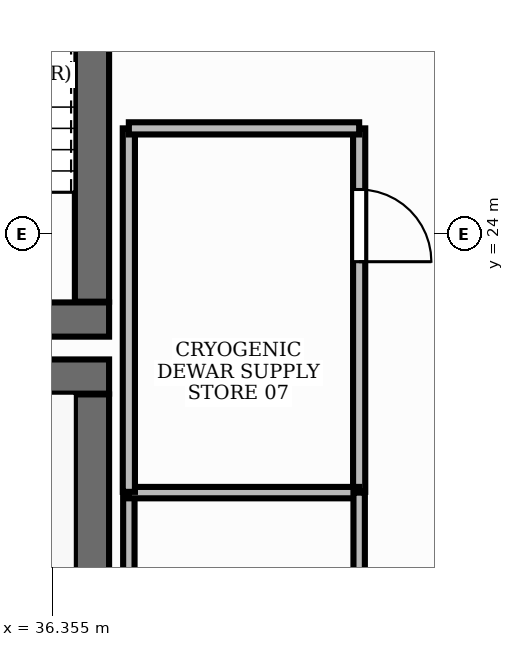
"""IFC4 building model, lengths in metres.
Left out: names, types, materials, properties, quantities, classifications, styles, units other than length and angle.
Written with IfcOpenShell. Run it as: python <this file> out.ifc"""

import sys

from ifc_helpers import new_model, si_unit, direction, frame, frame_2d, origin, place, context, subcontext, project, spatial, rectangle, extrude, element, fill, save


model = new_model("IFC4")
c1 = context("Model", 3, precision=1e-05, world=origin(), true_north=direction((0.0, 1.0)))
c2 = subcontext(c1, "Body", "Model", "MODEL_VIEW")
j1 = project(units=[si_unit("LENGTHUNIT", "METRE"), si_unit("PLANEANGLEUNIT", "RADIAN")], contexts=[c1])
p1 = place(None, origin())
s1 = spatial("IfcSite", under=j1, at=p1, CompositionType="ELEMENT")
p2 = place(p1, origin())
s2 = spatial("IfcBuilding", under=s1, at=p2, CompositionType="ELEMENT")
p3 = place(p2, frame((0.0, 0.0, 42.6)))
s3 = spatial("IfcBuildingStorey", under=s2, at=p3, CompositionType="ELEMENT", Elevation=42.6)
p4 = place(p3, frame((28.35, 22.125, 0.0), z_axis=(0.0, 0.0, 1.0), x_axis=(1.0, 0.0, 0.0)))
e1 = element("IfcWall", 1, at=p4, inside=s3, PredefinedType="SHEAR", context=c2, shape_type="SweptSolid", body=[
    extrude(rectangle(XDim=8.75, YDim=0.45, at=frame_2d((4.375, 0.0))), origin(), (0.0, 0.0, 1.0), 3.9),
])
p5 = place(p3, frame((36.875, 18.81, 0.0), z_axis=(0.0, 0.0, 1.0), x_axis=(0.0, 1.0, 0.0)))
e2 = element("IfcWall", 2, at=p5, inside=s3, PredefinedType="SHEAR", context=c2, shape_type="SweptSolid", body=[
    extrude(rectangle(XDim=3.08, YDim=0.45, at=frame_2d((1.54, 0.0))), origin(), (0.0, 0.0, 1.0), 3.9),
])
p6 = place(p3, frame((33.1, 22.875, 0.0), z_axis=(0.0, 0.0, 1.0), x_axis=(1.0, 0.0, 0.0)))
e3 = element("IfcWall", 3, at=p6, inside=s3, PredefinedType="SHEAR", context=c2, shape_type="SweptSolid", body=[
    extrude(rectangle(XDim=4.0, YDim=0.45, at=frame_2d((2.0, 0.0))), origin(), (0.0, 0.0, 1.0), 3.9),
])
p7 = place(p3, frame((36.875, 23.11, 0.0), z_axis=(0.0, 0.0, 1.0), x_axis=(0.0, 1.0, 0.0)))
e4 = element("IfcWall", 4, at=p7, inside=s3, PredefinedType="SHEAR", context=c2, shape_type="SweptSolid", body=[
    extrude(rectangle(XDim=7.78, YDim=0.45, at=frame_2d((3.89, 0.0))), origin(), (0.0, 0.0, 1.0), 3.9),
])
p8 = place(p3, frame((40.39, 25.39, 0.0), z_axis=(0.0, 0.0, 1.0), x_axis=(0.0, -1.0, 0.0)))
e5 = element("IfcWall", 5, at=p8, inside=s3, PredefinedType="PARTITIONING", context=c2, shape_type="SweptSolid", body=[
    extrude(rectangle(XDim=4.782, YDim=0.16, at=frame_2d((2.391, 0.0))), origin(), (0.0, 0.0, 1.0), 2.91),
])
p9 = place(p8, frame((0.804, 0.0, 0.0)))
e6 = element("IfcOpeningElement", 6, at=p9, cuts=e5, PredefinedType="OPENING", context=c2, shape_type="SweptSolid", body=[
    extrude(rectangle(XDim=0.95, YDim=2.15, at=frame_2d((0.475, 1.075))), frame((0.0, 0.095, 0.0), z_axis=(0.0, -1.0, 0.0), x_axis=(1.0, 0.0, 0.0)), (0.0, 0.0, 1.0), 0.19),
])
p10 = place(p3, frame((37.36, 18.1, 0.0), z_axis=(0.0, 0.0, 1.0), x_axis=(0.0, 1.0, 0.0)))
e7 = element("IfcWall", 7, at=p10, inside=s3, PredefinedType="PARTITIONING", context=c2, shape_type="SweptSolid", body=[
    extrude(rectangle(XDim=2.498, YDim=0.15, at=frame_2d((1.249, 0.0))), origin(), (0.0, 0.0, 1.0), 2.91),
])
p11 = place(p3, frame((37.36, 20.598, 0.0), z_axis=(0.0, 0.0, 1.0), x_axis=(1.0, 0.0, 0.0)))
e8 = element("IfcWall", 8, at=p11, inside=s3, PredefinedType="PARTITIONING", context=c2, shape_type="SweptSolid", body=[
    extrude(rectangle(XDim=3.03, YDim=0.15, at=frame_2d((1.515, 0.0))), origin(), (0.0, 0.0, 1.0), 2.91),
])
p12 = place(p3, frame((40.39, 20.598, 0.0), z_axis=(0.0, 0.0, 1.0), x_axis=(0.0, -1.0, 0.0)))
e9 = element("IfcWall", 9, at=p12, inside=s3, PredefinedType="PARTITIONING", context=c2, shape_type="SweptSolid", body=[
    extrude(rectangle(XDim=4.098, YDim=0.15, at=frame_2d((2.049, 0.0))), origin(), (0.0, 0.0, 1.0), 2.91),
])
p13 = place(p3, frame((37.36, 20.608, 0.0), z_axis=(0.0, 0.0, 1.0), x_axis=(0.0, 1.0, 0.0)))
e10 = element("IfcWall", 10, at=p13, inside=s3, PredefinedType="PARTITIONING", context=c2, shape_type="SweptSolid", body=[
    extrude(rectangle(XDim=4.782, YDim=0.16, at=frame_2d((2.391, 0.0))), origin(), (0.0, 0.0, 1.0), 2.91),
])
p14 = place(p3, frame((37.36, 25.39, 0.0), z_axis=(0.0, 0.0, 1.0), x_axis=(1.0, 0.0, 0.0)))
e11 = element("IfcWall", 11, at=p14, inside=s3, PredefinedType="PARTITIONING", context=c2, shape_type="SweptSolid", body=[
    extrude(rectangle(XDim=3.03, YDim=0.16, at=frame_2d((1.515, 0.0))), origin(), (0.0, 0.0, 1.0), 2.91),
])
p15 = place(p9, origin())
e12 = element("IfcDoor", 12, at=p15, inside=s3, OperationType="SINGLE_SWING_RIGHT", PredefinedType="DOOR", context=c2, shape_type="SweptSolid", body=[
    extrude(rectangle(XDim=0.95, YDim=2.15, at=frame_2d((0.475, 1.075))), frame((0.0, 0.025, 0.0), z_axis=(0.0, -1.0, 0.0), x_axis=(1.0, 0.0, 0.0)), (0.0, 0.0, 1.0), 0.05),
])
fill(e6, e12)
save(model, sys.argv[1])
